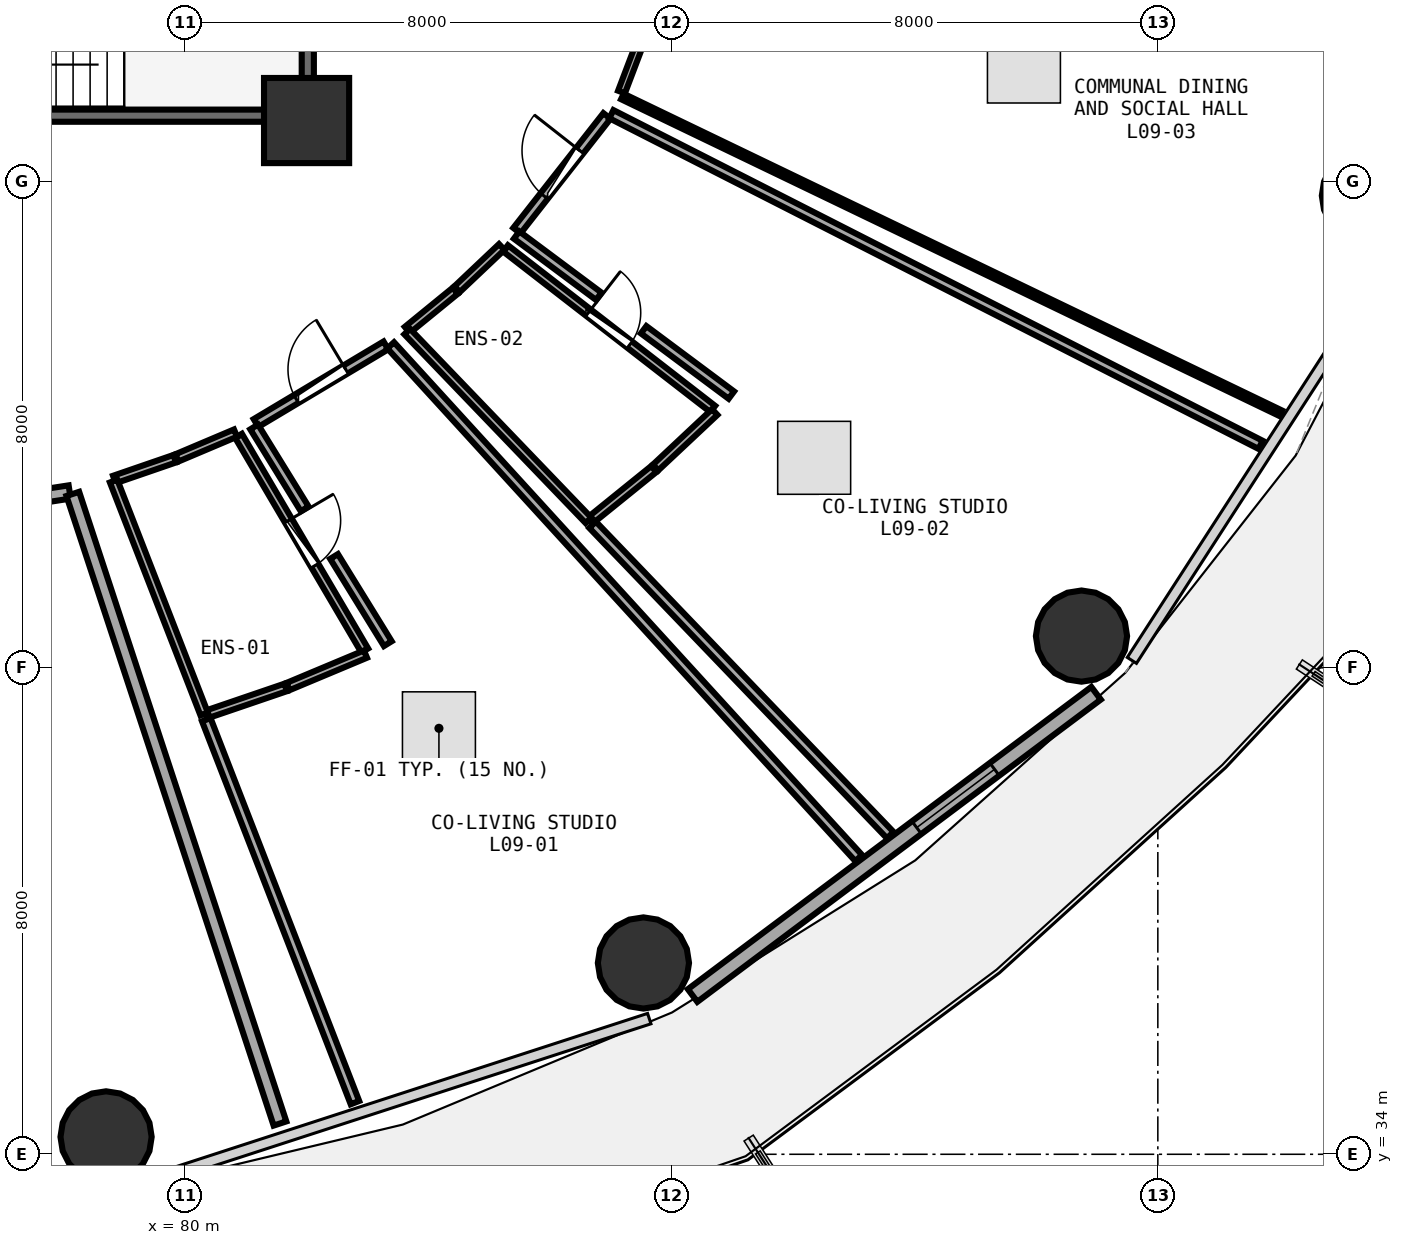
"""IFC4 building model, lengths in metres.
Left out: names, types, materials, properties, quantities, classifications, styles, units other than length and angle.
Written with IfcOpenShell. Run it as: python <this file> out.ifc"""

import sys

from ifc_helpers import new_model, si_unit, direction, frame, frame_2d, origin, origin_2d, place, context, subcontext, project, spatial, rectangle, circle, extrude, element, fill, save


model = new_model("IFC4")
c1 = context("Model", 3, precision=1e-05, world=origin(), true_north=direction((0.0, 1.0)))
c2 = subcontext(c1, "Body", "Model", "MODEL_VIEW")
j1 = project(units=[si_unit("LENGTHUNIT", "METRE"), si_unit("PLANEANGLEUNIT", "RADIAN")], contexts=[c1])
p1 = place(None, origin())
s1 = spatial("IfcSite", under=j1, at=p1, CompositionType="ELEMENT")
p2 = place(p1, origin())
s2 = spatial("IfcBuilding", under=s1, at=p2, CompositionType="ELEMENT")
p3 = place(p2, frame((0.0, 0.0, 37.5)))
s3 = spatial("IfcBuildingStorey", under=s2, at=p3, CompositionType="ELEMENT", Elevation=37.5)
p4 = place(p3, frame((82.0, 51.0, 0.0), z_axis=(0.0, 0.0, 1.0), x_axis=(1.0, 0.0, 0.0)))
e1 = element("IfcColumn", 1, at=p4, inside=s3, PredefinedType="PILASTER", context=c2, shape_type="SweptSolid", body=[
    extrude(rectangle(XDim=1.4, YDim=1.4, at=origin_2d()), origin(), (0.0, 0.0, 1.0), 3.75),
])
for number, where, z_axis, x_axis in (
    (2, (78.702, 34.286, 0.0), (0.0, 0.0, 1.0), (1.0, 0.0, 0.0)),
    (3, (87.54, 37.146, 0.0), (0.0, 0.0, 1.0), (1.0, 0.0, 0.0)),
    (4, (94.744, 42.522, 0.0), (0.0, 0.0, 1.0), (1.0, 0.0, 0.0)),
    (5, (99.447, 49.764, 0.0), (0.0, 0.0, 1.0), (1.0, 0.0, 0.0)),
):
    element("IfcColumn", number, at=place(p3, frame(where, z_axis=z_axis, x_axis=x_axis)), inside=s3, PredefinedType="COLUMN", context=c2, shape_type="SweptSolid", body=[
        extrude(circle(Radius=0.75, at=origin_2d()), origin(), (0.0, 0.0, 1.0), 3.75),
    ])
p5 = place(p3, frame((88.349, 36.611, 0.0), z_axis=(0.0, 0.0, 1.0), x_axis=(0.80030733173, 0.599590005569, 0.0)))
e6 = element("IfcWall", 6, at=p5, inside=s3, PredefinedType="SOLIDWALL", context=c2, shape_type="SweptSolid", body=[
    extrude(rectangle(XDim=8.291, YDim=0.26, at=frame_2d((4.145, 0.0))), origin(), (0.0, 0.0, 1.0), 3.475),
])
p6 = place(p5, frame((4.605, 0.0, 0.85)))
e7 = element("IfcOpeningElement", 7, at=p6, cuts=e6, PredefinedType="OPENING", context=c2, shape_type="SweptSolid", body=[
    extrude(rectangle(XDim=1.6, YDim=1.45, at=frame_2d((0.8, 0.725))), frame((0.0, 0.14, 0.0), z_axis=(0.0, -1.0, 0.0), x_axis=(1.0, 0.0, 0.0)), (0.0, 0.0, 1.0), 0.28),
])
p7 = place(p3, frame((74.0, 51.08, 0.0), z_axis=(0.0, 0.0, 1.0), x_axis=(1.0, 0.0, 0.0)))
e8 = element("IfcWall", 8, at=p7, inside=s3, PredefinedType="SHEAR", context=c2, shape_type="SweptSolid", body=[
    extrude(rectangle(XDim=7.9, YDim=0.2, at=frame_2d((3.95, 0.0))), origin(), (0.0, 0.0, 1.0), 3.49),
])
p8 = place(p7, frame((1.12, 0.0, 0.0)))
e9 = element("IfcOpeningElement", 9, at=p8, cuts=e8, PredefinedType="OPENING", context=c2, shape_type="SweptSolid", body=[
    extrude(rectangle(XDim=1.05, YDim=2.1, at=frame_2d((0.525, 1.05))), frame((0.0, 0.11, 0.0), z_axis=(0.0, -1.0, 0.0), x_axis=(1.0, 0.0, 0.0)), (0.0, 0.0, 1.0), 0.22),
])
p9 = place(p3, frame((82.02, 51.2, 0.0), z_axis=(0.0, 0.0, 1.0), x_axis=(0.0, 1.0, 0.0)))
e10 = element("IfcWall", 10, at=p9, inside=s3, PredefinedType="SHEAR", context=c2, shape_type="SweptSolid", body=[
    extrude(rectangle(XDim=3.07, YDim=0.2, at=frame_2d((1.535, 0.0))), origin(), (0.0, 0.0, 1.0), 3.49),
])
p10 = place(p3, frame((80.88, 45.816, 0.0), z_axis=(0.0, 0.0, 1.0), x_axis=(0.506780508638, -0.862075122054, 0.0)))
e11 = element("IfcWall", 11, at=p10, inside=s3, PredefinedType="PLUMBINGWALL", context=c2, shape_type="SweptSolid", body=[
    extrude(rectangle(XDim=4.097, YDim=0.13, at=frame_2d((2.048, 0.0))), origin(), (0.0, 0.0, 1.0), 2.875),
])
p11 = place(p10, frame((1.618, 0.0, 0.0)))
e12 = element("IfcOpeningElement", 12, at=p11, cuts=e11, PredefinedType="OPENING", context=c2, shape_type="SweptSolid", body=[
    extrude(rectangle(XDim=0.86, YDim=2.05, at=frame_2d((0.43, 1.025))), frame((0.0, 0.075, 0.0), z_axis=(0.0, -1.0, 0.0), x_axis=(1.0, 0.0, 0.0)), (0.0, 0.0, 1.0), 0.15),
])
p12 = place(p3, frame((81.168, 46.026, 0.0), z_axis=(0.0, 0.0, 1.0), x_axis=(0.858417867387, 0.512951035627, 0.0)))
e13 = element("IfcWall", 13, at=p12, inside=s3, PredefinedType="PARTITIONING", context=c2, shape_type="SweptSolid", body=[
    extrude(rectangle(XDim=2.488, YDim=0.15, at=frame_2d((1.244, 0.0))), origin(), (0.0, 0.0, 1.0), 2.875),
])
p13 = place(p12, frame((0.769, 0.0, 0.0)))
e14 = element("IfcOpeningElement", 14, at=p13, cuts=e13, PredefinedType="OPENING", context=c2, shape_type="SweptSolid", body=[
    extrude(rectangle(XDim=0.95, YDim=2.08, at=frame_2d((0.475, 1.04))), frame((0.0, 0.085, 0.0), z_axis=(0.0, -1.0, 0.0), x_axis=(1.0, 0.0, 0.0)), (0.0, 0.0, 1.0), 0.17),
])
p14 = place(p3, frame((85.271, 48.898, 0.0), z_axis=(0.0, 0.0, 1.0), x_axis=(0.790415052175, -0.612571665436, 0.0)))
e15 = element("IfcWall", 15, at=p14, inside=s3, PredefinedType="PLUMBINGWALL", context=c2, shape_type="SweptSolid", body=[
    extrude(rectangle(XDim=4.312, YDim=0.13, at=frame_2d((2.156, 0.0))), origin(), (0.0, 0.0, 1.0), 2.875),
])
p15 = place(p14, frame((1.726, 0.0, 0.0)))
e16 = element("IfcOpeningElement", 16, at=p15, cuts=e15, PredefinedType="OPENING", context=c2, shape_type="SweptSolid", body=[
    extrude(rectangle(XDim=0.86, YDim=2.05, at=frame_2d((0.43, 1.025))), frame((0.0, 0.075, 0.0), z_axis=(0.0, -1.0, 0.0), x_axis=(1.0, 0.0, 0.0)), (0.0, 0.0, 1.0), 0.15),
])
p16 = place(p3, frame((85.459, 49.188, 0.0), z_axis=(0.0, 0.0, 1.0), x_axis=(0.617295583742, 0.786731315185, 0.0)))
e17 = element("IfcWall", 17, at=p16, inside=s3, PredefinedType="PARTITIONING", context=c2, shape_type="SweptSolid", body=[
    extrude(rectangle(XDim=2.399, YDim=0.15, at=frame_2d((1.2, 0.0))), origin(), (0.0, 0.0, 1.0), 2.875),
])
p17 = place(p16, frame((0.725, 0.0, 0.0)))
e18 = element("IfcOpeningElement", 18, at=p17, cuts=e17, PredefinedType="OPENING", context=c2, shape_type="SweptSolid", body=[
    extrude(rectangle(XDim=0.95, YDim=2.08, at=frame_2d((0.475, 1.04))), frame((0.0, 0.085, 0.0), z_axis=(0.0, -1.0, 0.0), x_axis=(1.0, 0.0, 0.0)), (0.0, 0.0, 1.0), 0.17),
])
p18 = place(p3, frame((87.179, 51.469, 0.0), z_axis=(0.0, 0.0, 1.0), x_axis=(0.355069987825, 0.934839720886, 0.0)))
e19 = element("IfcWall", 19, at=p18, inside=s3, PredefinedType="PARTITIONING", context=c2, shape_type="SweptSolid", body=[
    extrude(rectangle(XDim=4.62, YDim=0.12, at=frame_2d((2.31, 0.0))), origin(), (0.0, 0.0, 1.0), 3.48),
])
p19 = place(p18, frame((1.86, 0.0, 0.0)))
e20 = element("IfcOpeningElement", 20, at=p19, cuts=e19, PredefinedType="OPENING", context=c2, shape_type="SweptSolid", body=[
    extrude(rectangle(XDim=0.9, YDim=2.08, at=frame_2d((0.45, 1.04))), frame((0.0, 0.07, 0.0), z_axis=(0.0, -1.0, 0.0), x_axis=(1.0, 0.0, 0.0)), (0.0, 0.0, 1.0), 0.14),
])
p20 = place(p3, frame((74.914, 44.399, 0.0), z_axis=(0.0, 0.0, 1.0), x_axis=(0.988282336333, 0.152636901479, 0.0)))
e21 = element("IfcWall", 21, at=p20, inside=s3, PredefinedType="SOLIDWALL", context=c2, shape_type="SweptSolid", body=[
    extrude(rectangle(XDim=3.228, YDim=0.22, at=frame_2d((1.614, 0.0))), origin(), (0.0, 0.0, 1.0), 3.235),
])
p21 = place(p3, frame((78.156, 44.86, 0.0), z_axis=(0.0, 0.0, 1.0), x_axis=(0.312563345706, -0.94989691805, 0.0)))
e22 = element("IfcWall", 22, at=p21, inside=s3, PredefinedType="SOLIDWALL", context=c2, shape_type="SweptSolid", body=[
    extrude(rectangle(XDim=10.9, YDim=0.22, at=frame_2d((5.45, 0.0))), origin(), (0.0, 0.0, 1.0), 2.875),
])
p22 = place(p3, frame((78.838, 45.096, 0.0), z_axis=(0.0, 0.0, 1.0), x_axis=(0.94549887916, 0.325625351451, 0.0)))
e23 = element("IfcWall", 23, at=p22, inside=s3, PredefinedType="PLUMBINGWALL", context=c2, shape_type="SweptSolid", body=[
    extrude(rectangle(XDim=1.05, YDim=0.13, at=frame_2d((0.525, 0.0))), origin(), (0.0, 0.0, 1.0), 3.48),
])
p23 = place(p3, frame((79.868, 45.453, 0.0), z_axis=(0.0, 0.0, 1.0), x_axis=(0.921054231529, 0.389434336677, 0.0)))
e24 = element("IfcWall", 24, at=p23, inside=s3, PredefinedType="PLUMBINGWALL", context=c2, shape_type="SweptSolid", body=[
    extrude(rectangle(XDim=1.046, YDim=0.13, at=frame_2d((0.523, 0.0))), origin(), (0.0, 0.0, 1.0), 2.875),
])
p24 = place(p3, frame((82.969, 42.225, 0.0), z_axis=(0.0, 0.0, 1.0), x_axis=(-0.922358986458, -0.38633392305, 0.0)))
e25 = element("IfcWall", 25, at=p24, inside=s3, PredefinedType="PLUMBINGWALL", context=c2, shape_type="SweptSolid", body=[
    extrude(rectangle(XDim=1.381, YDim=0.13, at=frame_2d((0.691, 0.0))), origin(), (0.0, 0.0, 1.0), 3.48),
])
p25 = place(p3, frame((81.657, 41.677, 0.0), z_axis=(0.0, 0.0, 1.0), x_axis=(-0.946374749486, -0.323070941954, 0.0)))
e26 = element("IfcWall", 26, at=p25, inside=s3, PredefinedType="PLUMBINGWALL", context=c2, shape_type="SweptSolid", body=[
    extrude(rectangle(XDim=1.39, YDim=0.13, at=frame_2d((0.695, 0.0))), origin(), (0.0, 0.0, 1.0), 3.175),
])
p26 = place(p3, frame((80.316, 41.24, 0.0), z_axis=(0.0, 0.0, 1.0), x_axis=(-0.362443394787, 0.932005786235, 0.0)))
e27 = element("IfcWall", 27, at=p26, inside=s3, PredefinedType="PLUMBINGWALL", context=c2, shape_type="SweptSolid", body=[
    extrude(rectangle(XDim=4.11, YDim=0.13, at=frame_2d((2.055, 0.0))), origin(), (0.0, 0.0, 1.0), 2.875),
])
p27 = place(p3, frame((83.383, 47.303, 0.0), z_axis=(0.0, 0.0, 1.0), x_axis=(0.674190259417, -0.738557712103, 0.0)))
e28 = element("IfcWall", 28, at=p27, inside=s3, PredefinedType="PARTITIONING", context=c2, shape_type="SweptSolid", body=[
    extrude(rectangle(XDim=11.417, YDim=0.15, at=frame_2d((5.708, 0.0))), origin(), (0.0, 0.0, 1.0), 2.875),
])
p28 = place(p3, frame((82.795, 34.849, 0.0), z_axis=(0.0, 0.0, 1.0), x_axis=(-0.361912521495, 0.93221206106, 0.0)))
e29 = element("IfcWall", 29, at=p28, inside=s3, PredefinedType="PARTITIONING", context=c2, shape_type="SweptSolid", body=[
    extrude(rectangle(XDim=6.755, YDim=0.15, at=frame_2d((3.378, 0.0))), origin(), (0.0, 0.0, 1.0), 2.875),
])
p29 = place(p3, frame((83.336, 42.397, 0.0), z_axis=(0.0, 0.0, 1.0), x_axis=(-0.524816947244, 0.85121511493, 0.0)))
e30 = element("IfcWall", 30, at=p29, inside=s3, PredefinedType="PARTITIONING", context=c2, shape_type="SweptSolid", body=[
    extrude(rectangle(XDim=1.685, YDim=0.15, at=frame_2d((0.842, 0.0))), origin(), (0.0, 0.0, 1.0), 3.48),
])
p30 = place(p3, frame((81.969, 44.614, 0.0), z_axis=(0.0, 0.0, 1.0), x_axis=(-0.524983702504, 0.851112279376, 0.0)))
e31 = element("IfcWall", 31, at=p30, inside=s3, PredefinedType="PARTITIONING", context=c2, shape_type="SweptSolid", body=[
    extrude(rectangle(XDim=1.583, YDim=0.15, at=frame_2d((0.791, 0.0))), origin(), (0.0, 0.0, 1.0), 2.875),
])
p31 = place(p3, frame((83.656, 47.557, 0.0), z_axis=(0.0, 0.0, 1.0), x_axis=(0.774821757106, 0.632179756648, 0.0)))
e32 = element("IfcWall", 32, at=p31, inside=s3, PredefinedType="PLUMBINGWALL", context=c2, shape_type="SweptSolid", body=[
    extrude(rectangle(XDim=1.018, YDim=0.13, at=frame_2d((0.509, 0.0))), origin(), (0.0, 0.0, 1.0), 3.48),
])
p32 = place(p3, frame((84.476, 48.227, 0.0), z_axis=(0.0, 0.0, 1.0), x_axis=(0.726289091807, 0.687389376644, 0.0)))
e33 = element("IfcWall", 33, at=p32, inside=s3, PredefinedType="PLUMBINGWALL", context=c2, shape_type="SweptSolid", body=[
    extrude(rectangle(XDim=1.01, YDim=0.13, at=frame_2d((0.505, 0.0))), origin(), (0.0, 0.0, 1.0), 2.875),
])
p33 = place(p3, frame((88.712, 46.206, 0.0), z_axis=(0.0, 0.0, 1.0), x_axis=(-0.729371491019, -0.684117846638, 0.0)))
e34 = element("IfcWall", 34, at=p33, inside=s3, PredefinedType="PLUMBINGWALL", context=c2, shape_type="SweptSolid", body=[
    extrude(rectangle(XDim=1.333, YDim=0.13, at=frame_2d((0.666, 0.0))), origin(), (0.0, 0.0, 1.0), 3.48),
])
p34 = place(p3, frame((87.71, 45.268, 0.0), z_axis=(0.0, 0.0, 1.0), x_axis=(-0.777667827493, -0.628675393254, 0.0)))
e35 = element("IfcWall", 35, at=p34, inside=s3, PredefinedType="PLUMBINGWALL", context=c2, shape_type="SweptSolid", body=[
    extrude(rectangle(XDim=1.344, YDim=0.13, at=frame_2d((0.672, 0.0))), origin(), (0.0, 0.0, 1.0), 3.48),
])
p35 = place(p3, frame((86.636, 44.425, 0.0), z_axis=(0.0, 0.0, 1.0), x_axis=(-0.692667606139, 0.721256949641, 0.0)))
e36 = element("IfcWall", 36, at=p35, inside=s3, PredefinedType="PLUMBINGWALL", context=c2, shape_type="SweptSolid", body=[
    extrude(rectangle(XDim=4.304, YDim=0.13, at=frame_2d((2.152, 0.0))), origin(), (0.0, 0.0, 1.0), 3.235),
])
p36 = place(p3, frame((87.013, 51.105, 0.0), z_axis=(0.0, 0.0, 1.0), x_axis=(0.891110388763, -0.453786596363, 0.0)))
e37 = element("IfcWall", 37, at=p36, inside=s3, PredefinedType="PARTITIONING", context=c2, shape_type="SweptSolid", body=[
    extrude(rectangle(XDim=11.982, YDim=0.15, at=frame_2d((5.991, 0.0))), origin(), (0.0, 0.0, 1.0), 2.875),
])
p37 = place(p3, frame((91.599, 39.249, 0.0), z_axis=(0.0, 0.0, 1.0), x_axis=(-0.692282424726, 0.721626665538, 0.0)))
e38 = element("IfcWall", 38, at=p37, inside=s3, PredefinedType="PARTITIONING", context=c2, shape_type="SweptSolid", body=[
    extrude(rectangle(XDim=7.072, YDim=0.15, at=frame_2d((3.536, 0.0))), origin(), (0.0, 0.0, 1.0), 2.875),
])
p38 = place(p3, frame((88.986, 46.485, 0.0), z_axis=(0.0, 0.0, 1.0), x_axis=(-0.801771878898, 0.597630198542, 0.0)))
e39 = element("IfcWall", 39, at=p38, inside=s3, PredefinedType="PARTITIONING", context=c2, shape_type="SweptSolid", body=[
    extrude(rectangle(XDim=1.799, YDim=0.15, at=frame_2d((0.899, 0.0))), origin(), (0.0, 0.0, 1.0), 2.875),
])
p39 = place(p3, frame((86.806, 48.11, 0.0), z_axis=(0.0, 0.0, 1.0), x_axis=(-0.801786232624, 0.597610941311, 0.0)))
e40 = element("IfcWall", 40, at=p39, inside=s3, PredefinedType="PARTITIONING", context=c2, shape_type="SweptSolid", body=[
    extrude(rectangle(XDim=1.686, YDim=0.15, at=frame_2d((0.843, 0.0))), origin(), (0.0, 0.0, 1.0), 3.48),
])
p40 = place(p3, frame((98.022, 46.186, 0.0), z_axis=(0.0, 0.0, 1.0), x_axis=(-0.901130168513, 0.43354863556, 0.0)))
e41 = element("IfcWall", 41, at=p40, inside=s3, PredefinedType="PARTITIONING", context=c2, shape_type="SweptSolid", body=[
    extrude(rectangle(XDim=12.016, YDim=0.1, at=frame_2d((6.008, 0.0))), origin(), (0.0, 0.0, 1.0), 2.875),
])
p41 = place(p6, origin())
e42 = element("IfcWindow", 42, at=p41, inside=s3, PartitioningType="SINGLE_PANEL", PredefinedType="WINDOW", context=c2, shape_type="SweptSolid", body=[
    extrude(rectangle(XDim=1.6, YDim=1.45, at=frame_2d((0.8, 0.725))), frame((0.0, 0.03, 0.0), z_axis=(0.0, -1.0, 0.0), x_axis=(1.0, 0.0, 0.0)), (0.0, 0.0, 1.0), 0.06),
])
fill(e7, e42)
p42 = place(p11, origin())
e43 = element("IfcDoor", 43, at=p42, inside=s3, OperationType="SINGLE_SWING_LEFT", PredefinedType="DOOR", context=c2, shape_type="SweptSolid", body=[
    extrude(rectangle(XDim=0.86, YDim=2.05, at=frame_2d((0.43, 1.025))), frame((0.0, 0.025, 0.0), z_axis=(0.0, -1.0, 0.0), x_axis=(1.0, 0.0, 0.0)), (0.0, 0.0, 1.0), 0.05),
])
fill(e12, e43)
p43 = place(p13, origin())
e44 = element("IfcDoor", 44, at=p43, inside=s3, OperationType="SINGLE_SWING_RIGHT", PredefinedType="DOOR", context=c2, shape_type="SweptSolid", body=[
    extrude(rectangle(XDim=0.95, YDim=2.08, at=frame_2d((0.475, 1.04))), frame((0.0, 0.025, 0.0), z_axis=(0.0, -1.0, 0.0), x_axis=(1.0, 0.0, 0.0)), (0.0, 0.0, 1.0), 0.05),
])
fill(e14, e44)
p44 = place(p15, origin())
e45 = element("IfcDoor", 45, at=p44, inside=s3, OperationType="SINGLE_SWING_LEFT", PredefinedType="DOOR", context=c2, shape_type="SweptSolid", body=[
    extrude(rectangle(XDim=0.86, YDim=2.05, at=frame_2d((0.43, 1.025))), frame((0.0, 0.025, 0.0), z_axis=(0.0, -1.0, 0.0), x_axis=(1.0, 0.0, 0.0)), (0.0, 0.0, 1.0), 0.05),
])
fill(e16, e45)
p45 = place(p17, origin())
e46 = element("IfcDoor", 46, at=p45, inside=s3, OperationType="SINGLE_SWING_RIGHT", PredefinedType="DOOR", context=c2, shape_type="SweptSolid", body=[
    extrude(rectangle(XDim=0.95, YDim=2.08, at=frame_2d((0.475, 1.04))), frame((0.0, 0.025, 0.0), z_axis=(0.0, -1.0, 0.0), x_axis=(1.0, 0.0, 0.0)), (0.0, 0.0, 1.0), 0.05),
])
fill(e18, e46)
save(model, sys.argv[1])
